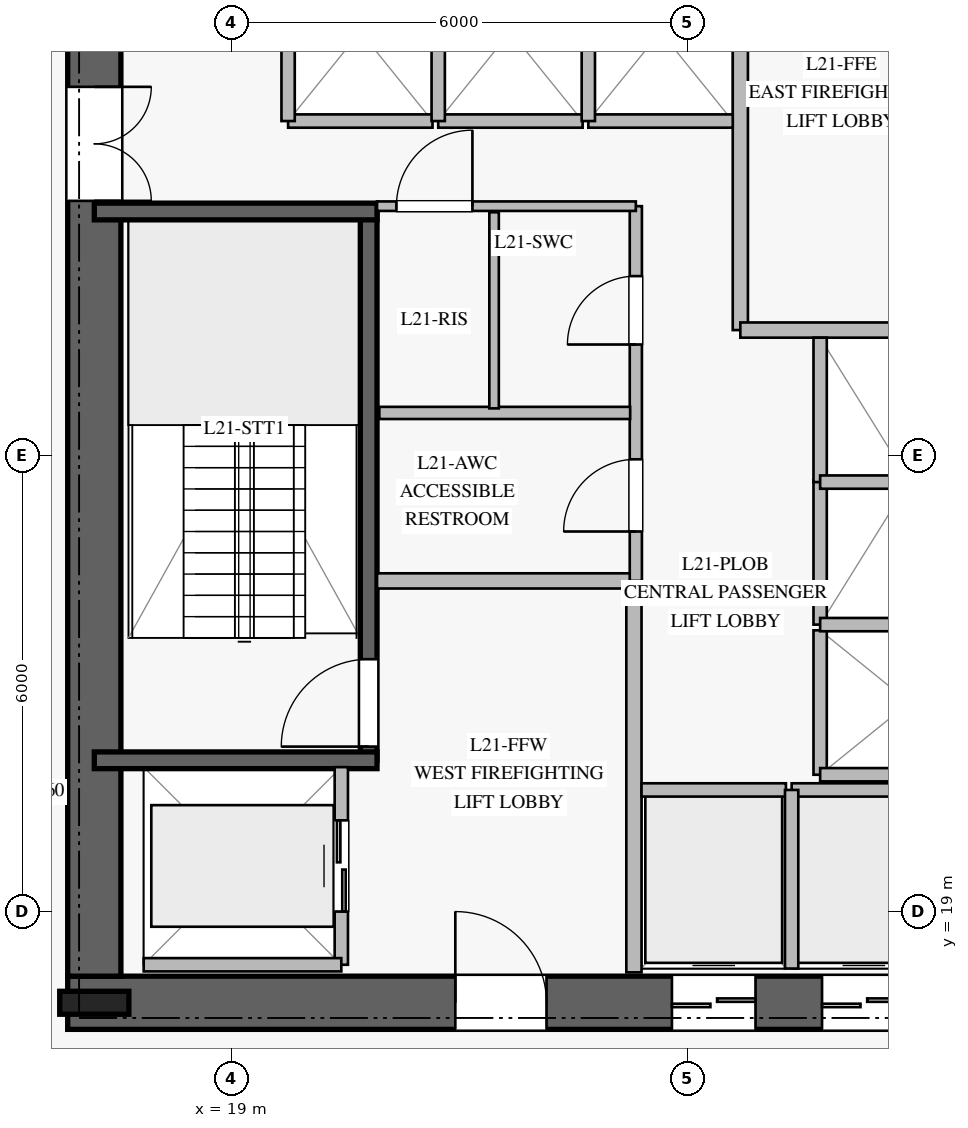
"""IFC4 building model, lengths in metres.
Left out: names, types, materials, properties, quantities, classifications, styles, units other than length and angle.
Written with IfcOpenShell. Run it as: python <this file> out.ifc"""

import sys

from ifc_helpers import new_model, si_unit, direction, frame, frame_2d, origin, origin_2d, place, context, subcontext, project, spatial, rectangle, i_section, extrude, element, fill, save


model = new_model("IFC4")
c1 = context("Model", 3, precision=1e-05, world=origin(), true_north=direction((0.0, 1.0)))
c2 = subcontext(c1, "Body", "Model", "MODEL_VIEW")
j1 = project(units=[si_unit("LENGTHUNIT", "METRE"), si_unit("PLANEANGLEUNIT", "RADIAN")], contexts=[c1])
p1 = place(None, origin())
s1 = spatial("IfcSite", under=j1, at=p1, CompositionType="ELEMENT")
p2 = place(p1, origin())
s2 = spatial("IfcBuilding", under=s1, at=p2, CompositionType="ELEMENT")
p3 = place(p2, frame((0.0, 0.0, 88.0)))
s3 = spatial("IfcBuildingStorey", under=s2, at=p3, CompositionType="ELEMENT", Elevation=88.0)
p4 = place(p3, frame((16.85, 17.8, 0.0), z_axis=(0.0, 0.0, 1.0), x_axis=(1.0, 0.0, 0.0)))
e1 = element("IfcWall", 1, at=p4, inside=s3, PredefinedType="SHEAR", context=c2, shape_type="SweptSolid", body=[
    extrude(rectangle(XDim=16.3, YDim=0.7, at=frame_2d((8.15, 0.0))), origin(), (0.0, 0.0, 1.0), 3.7),
])
p5 = place(p4, frame((5.1, 0.0, 0.0)))
e2 = element("IfcOpeningElement", 2, at=p5, cuts=e1, PredefinedType="OPENING", context=c2, shape_type="SweptSolid", body=[
    extrude(rectangle(XDim=1.2, YDim=2.25, at=frame_2d((0.6, 1.125))), frame((0.0, 0.36, 0.0), z_axis=(0.0, -1.0, 0.0), x_axis=(1.0, 0.0, 0.0)), (0.0, 0.0, 1.0), 0.72),
])
p6 = place(p4, frame((14.05, 0.0, 0.0)))
e3 = element("IfcOpeningElement", 3, at=p6, cuts=e1, PredefinedType="OPENING", context=c2, shape_type="SweptSolid", body=[
    extrude(rectangle(XDim=0.9, YDim=2.1, at=frame_2d((0.45, 1.05))), frame((0.0, 0.36, 0.0), z_axis=(0.0, -1.0, 0.0), x_axis=(1.0, 0.0, 0.0)), (0.0, 0.0, 1.0), 0.72),
])
p7 = place(p4, frame((7.95, 0.0, 0.0)))
e4 = element("IfcOpeningElement", 4, at=p7, cuts=e1, PredefinedType="OPENING", context=c2, shape_type="SweptSolid", body=[
    extrude(rectangle(XDim=1.1, YDim=2.2, at=frame_2d((0.55, 1.1))), frame((0.0, 0.36, 0.0), z_axis=(0.0, -1.0, 0.0), x_axis=(1.0, 0.0, 0.0)), (0.0, 0.0, 1.0), 0.72),
])
p8 = place(p4, frame((9.925, 0.0, 0.0)))
e5 = element("IfcOpeningElement", 5, at=p8, cuts=e1, PredefinedType="OPENING", context=c2, shape_type="SweptSolid", body=[
    extrude(rectangle(XDim=1.1, YDim=2.2, at=frame_2d((0.55, 1.1))), frame((0.0, 0.36, 0.0), z_axis=(0.0, -1.0, 0.0), x_axis=(1.0, 0.0, 0.0)), (0.0, 0.0, 1.0), 0.72),
])
p9 = place(p4, frame((11.9, 0.0, 0.0)))
e6 = element("IfcOpeningElement", 6, at=p9, cuts=e1, PredefinedType="OPENING", context=c2, shape_type="SweptSolid", body=[
    extrude(rectangle(XDim=1.1, YDim=2.2, at=frame_2d((0.55, 1.1))), frame((0.0, 0.36, 0.0), z_axis=(0.0, -1.0, 0.0), x_axis=(1.0, 0.0, 0.0)), (0.0, 0.0, 1.0), 0.72),
])
p10 = place(p3, frame((17.2, 31.85, 0.0), z_axis=(0.0, 0.0, 1.0), x_axis=(0.0, -1.0, 0.0)))
e7 = element("IfcWall", 7, at=p10, inside=s3, PredefinedType="SHEAR", context=c2, shape_type="SweptSolid", body=[
    extrude(rectangle(XDim=13.7, YDim=0.7, at=frame_2d((6.85, 0.0))), origin(), (0.0, 0.0, 1.0), 3.7),
])
p11 = place(p10, frame((2.0, 0.0, 0.0)))
e8 = element("IfcOpeningElement", 8, at=p11, cuts=e7, PredefinedType="OPENING", context=c2, shape_type="SweptSolid", body=[
    extrude(rectangle(XDim=1.5, YDim=2.2, at=frame_2d((0.75, 1.1))), frame((0.0, 0.36, 0.0), z_axis=(0.0, -1.0, 0.0), x_axis=(1.0, 0.0, 0.0)), (0.0, 0.0, 1.0), 0.72),
])
p12 = place(p3, frame((17.2, 17.8, 0.0), z_axis=(0.0, 0.0, 1.0), x_axis=(1.0, 0.0, 0.0)))
e9 = element("IfcColumn", 9, at=p12, inside=s3, PredefinedType="COLUMN", context=c2, shape_type="SweptSolid", body=[
    extrude(i_section(OverallWidth=0.302, OverallDepth=0.91, WebThickness=0.021, FlangeThickness=0.04, at=origin_2d()), origin(), (0.0, 0.0, 1.0), 4.0),
])
p13 = place(p3, frame((20.81, 20.99, 0.0), z_axis=(0.0, 0.0, 1.0), x_axis=(0.0, 1.0, 0.0)))
e10 = element("IfcWall", 10, at=p13, inside=s3, PredefinedType="SOLIDWALL", context=c2, shape_type="SweptSolid", body=[
    extrude(rectangle(XDim=7.22, YDim=0.22, at=frame_2d((3.61, 0.0))), origin(), (0.0, 0.0, 1.0), 3.7),
])
p14 = place(p13, frame((0.18, 0.0, 0.0)))
e11 = element("IfcOpeningElement", 11, at=p14, cuts=e10, PredefinedType="OPENING", context=c2, shape_type="SweptSolid", body=[
    extrude(rectangle(XDim=1.15, YDim=2.2, at=frame_2d((0.575, 1.1))), frame((0.0, 0.12, 0.0), z_axis=(0.0, -1.0, 0.0), x_axis=(1.0, 0.0, 0.0)), (0.0, 0.0, 1.0), 0.24),
])
for number, where, z_axis, x_axis in (
    (12, (17.2, 20.99, 0.0), (0.0, 0.0, 1.0), (1.0, 0.0, 0.0)),
    (13, (17.2, 28.21, 0.0), (0.0, 0.0, 1.0), (1.0, 0.0, 0.0)),
):
    element("IfcWall", number, at=place(p3, frame(where, z_axis=z_axis, x_axis=x_axis)), inside=s3, PredefinedType="SOLIDWALL", context=c2, shape_type="SweptSolid", body=[
        extrude(rectangle(XDim=3.72, YDim=0.22, at=frame_2d((1.86, 0.0))), origin(), (0.0, 0.0, 1.0), 3.7),
    ])
p15 = place(p3, frame((24.3, 18.2, 0.0), z_axis=(0.0, 0.0, 1.0), x_axis=(0.0, 1.0, 0.0)))
e14 = element("IfcWall", 14, at=p15, inside=s3, PredefinedType="PARTITIONING", context=c2, shape_type="SweptSolid", body=[
    extrude(rectangle(XDim=5.15, YDim=0.2, at=frame_2d((2.575, 0.0))), origin(), (0.0, 0.0, 1.0), 3.7),
])
p16 = place(p3, frame((20.92, 23.35, 0.0), z_axis=(0.0, 0.0, 1.0), x_axis=(1.0, 0.0, 0.0)))
e15 = element("IfcWall", 15, at=p16, inside=s3, PredefinedType="PARTITIONING", context=c2, shape_type="SweptSolid", body=[
    extrude(rectangle(XDim=3.38, YDim=0.2, at=frame_2d((1.69, 0.0))), origin(), (0.0, 0.0, 1.0), 3.7),
])
p17 = place(p3, frame((25.7, 26.65, 0.0), z_axis=(0.0, 0.0, 1.0), x_axis=(0.0, 1.0, 0.0)))
e16 = element("IfcWall", 16, at=p17, inside=s3, PredefinedType="PARTITIONING", context=c2, shape_type="SweptSolid", body=[
    extrude(rectangle(XDim=5.15, YDim=0.2, at=frame_2d((2.575, 0.0))), origin(), (0.0, 0.0, 1.0), 3.7),
])
p18 = place(p3, frame((25.7, 26.65, 0.0), z_axis=(0.0, 0.0, 1.0), x_axis=(1.0, 0.0, 0.0)))
e17 = element("IfcWall", 17, at=p18, inside=s3, PredefinedType="PARTITIONING", context=c2, shape_type="SweptSolid", body=[
    extrude(rectangle(XDim=3.38, YDim=0.2, at=frame_2d((1.69, 0.0))), origin(), (0.0, 0.0, 1.0), 3.7),
])
p19 = place(p3, frame((24.325, 23.35, 0.0), z_axis=(0.0, 0.0, 1.0), x_axis=(0.0, 1.0, 0.0)))
e18 = element("IfcWall", 18, at=p19, inside=s3, PredefinedType="PLUMBINGWALL", context=c2, shape_type="SweptSolid", body=[
    extrude(rectangle(XDim=4.93, YDim=0.16, at=frame_2d((2.465, 0.0))), origin(), (0.0, 0.0, 1.0), 3.7),
])
p20 = place(p19, frame((0.65, 0.0, 0.0)))
e19 = element("IfcOpeningElement", 19, at=p20, cuts=e18, PredefinedType="OPENING", context=c2, shape_type="SweptSolid", body=[
    extrude(rectangle(XDim=0.95, YDim=2.1, at=frame_2d((0.475, 1.05))), frame((0.0, 0.09, 0.0), z_axis=(0.0, -1.0, 0.0), x_axis=(1.0, 0.0, 0.0)), (0.0, 0.0, 1.0), 0.18),
])
p21 = place(p19, frame((3.11, 0.0, 0.0)))
e20 = element("IfcOpeningElement", 20, at=p21, cuts=e18, PredefinedType="OPENING", context=c2, shape_type="SweptSolid", body=[
    extrude(rectangle(XDim=0.9, YDim=2.1, at=frame_2d((0.45, 1.05))), frame((0.0, 0.09, 0.0), z_axis=(0.0, -1.0, 0.0), x_axis=(1.0, 0.0, 0.0)), (0.0, 0.0, 1.0), 0.18),
])
p22 = place(p3, frame((20.92, 28.28, 0.0), z_axis=(0.0, 0.0, 1.0), x_axis=(1.0, 0.0, 0.0)))
e21 = element("IfcWall", 21, at=p22, inside=s3, PredefinedType="PARTITIONING", context=c2, shape_type="SweptSolid", body=[
    extrude(rectangle(XDim=3.405, YDim=0.125, at=frame_2d((1.703, 0.0))), origin(), (0.0, 0.0, 1.0), 3.7),
])
p23 = place(p22, frame((0.255, 0.0, 0.0)))
e22 = element("IfcOpeningElement", 22, at=p23, cuts=e21, PredefinedType="OPENING", context=c2, shape_type="SweptSolid", body=[
    extrude(rectangle(XDim=1.0, YDim=2.15, at=frame_2d((0.5, 1.075))), frame((0.0, 0.073, 0.0), z_axis=(0.0, -1.0, 0.0), x_axis=(1.0, 0.0, 0.0)), (0.0, 0.0, 1.0), 0.145),
])
p24 = place(p3, frame((20.95, 25.56, 0.0), z_axis=(0.0, 0.0, 1.0), x_axis=(1.0, 0.0, 0.0)))
e23 = element("IfcWall", 23, at=p24, inside=s3, PredefinedType="PLUMBINGWALL", context=c2, shape_type="SweptSolid", body=[
    extrude(rectangle(XDim=3.3, YDim=0.16, at=frame_2d((1.65, 0.0))), origin(), (0.0, 0.0, 1.0), 3.7),
])
p25 = place(p3, frame((22.46, 25.62, 0.0), z_axis=(0.0, 0.0, 1.0), x_axis=(0.0, 1.0, 0.0)))
e24 = element("IfcWall", 24, at=p25, inside=s3, PredefinedType="PARTITIONING", context=c2, shape_type="SweptSolid", body=[
    extrude(rectangle(XDim=2.58, YDim=0.125, at=frame_2d((1.29, 0.0))), origin(), (0.0, 0.0, 1.0), 3.7),
])
p26 = place(p3, frame((24.4, 20.6, 0.0), z_axis=(0.0, 0.0, 1.0), x_axis=(1.0, 0.0, 0.0)))
e25 = element("IfcWall", 25, at=p26, inside=s3, PredefinedType="PARTITIONING", context=c2, shape_type="SweptSolid", body=[
    extrude(rectangle(XDim=1.9, YDim=0.175, at=frame_2d((0.95, 0.0))), origin(), (0.0, 0.0, 1.0), 3.7),
])
p27 = place(p3, frame((26.375, 20.6, 0.0), z_axis=(0.0, 0.0, 1.0), x_axis=(1.0, 0.0, 0.0)))
e26 = element("IfcWall", 26, at=p27, inside=s3, PredefinedType="PARTITIONING", context=c2, shape_type="SweptSolid", body=[
    extrude(rectangle(XDim=1.9, YDim=0.175, at=frame_2d((0.95, 0.0))), origin(), (0.0, 0.0, 1.0), 3.7),
])
p28 = place(p3, frame((26.375, 18.25, 0.0), z_axis=(0.0, 0.0, 1.0), x_axis=(0.0, 1.0, 0.0)))
e27 = element("IfcWall", 27, at=p28, inside=s3, PredefinedType="PARTITIONING", context=c2, shape_type="SweptSolid", body=[
    extrude(rectangle(XDim=2.35, YDim=0.175, at=frame_2d((1.175, 0.0))), origin(), (0.0, 0.0, 1.0), 3.7),
])
p29 = place(p3, frame((19.75, 29.4, 0.0), z_axis=(0.0, 0.0, 1.0), x_axis=(1.0, 0.0, 0.0)))
e28 = element("IfcWall", 28, at=p29, inside=s3, PredefinedType="PARTITIONING", context=c2, shape_type="SweptSolid", body=[
    extrude(rectangle(XDim=1.9, YDim=0.175, at=frame_2d((0.95, 0.0))), origin(), (0.0, 0.0, 1.0), 3.7),
])
p30 = place(p3, frame((19.75, 29.4, 0.0), z_axis=(0.0, 0.0, 1.0), x_axis=(0.0, 1.0, 0.0)))
e29 = element("IfcWall", 29, at=p30, inside=s3, PredefinedType="PARTITIONING", context=c2, shape_type="SweptSolid", body=[
    extrude(rectangle(XDim=2.35, YDim=0.175, at=frame_2d((1.175, 0.0))), origin(), (0.0, 0.0, 1.0), 3.7),
])
p31 = place(p3, frame((21.725, 29.4, 0.0), z_axis=(0.0, 0.0, 1.0), x_axis=(1.0, 0.0, 0.0)))
e30 = element("IfcWall", 30, at=p31, inside=s3, PredefinedType="PARTITIONING", context=c2, shape_type="SweptSolid", body=[
    extrude(rectangle(XDim=1.9, YDim=0.175, at=frame_2d((0.95, 0.0))), origin(), (0.0, 0.0, 1.0), 3.7),
])
p32 = place(p3, frame((21.725, 29.4, 0.0), z_axis=(0.0, 0.0, 1.0), x_axis=(0.0, 1.0, 0.0)))
e31 = element("IfcWall", 31, at=p32, inside=s3, PredefinedType="PARTITIONING", context=c2, shape_type="SweptSolid", body=[
    extrude(rectangle(XDim=2.35, YDim=0.175, at=frame_2d((1.175, 0.0))), origin(), (0.0, 0.0, 1.0), 3.7),
])
p33 = place(p3, frame((23.7, 29.4, 0.0), z_axis=(0.0, 0.0, 1.0), x_axis=(1.0, 0.0, 0.0)))
e32 = element("IfcWall", 32, at=p33, inside=s3, PredefinedType="PARTITIONING", context=c2, shape_type="SweptSolid", body=[
    extrude(rectangle(XDim=1.9, YDim=0.175, at=frame_2d((0.95, 0.0))), origin(), (0.0, 0.0, 1.0), 3.7),
])
p34 = place(p3, frame((23.7, 29.4, 0.0), z_axis=(0.0, 0.0, 1.0), x_axis=(0.0, 1.0, 0.0)))
e33 = element("IfcWall", 33, at=p34, inside=s3, PredefinedType="PARTITIONING", context=c2, shape_type="SweptSolid", body=[
    extrude(rectangle(XDim=2.35, YDim=0.175, at=frame_2d((1.175, 0.0))), origin(), (0.0, 0.0, 1.0), 3.7),
])
p35 = place(p3, frame((26.75, 20.8, 0.0), z_axis=(0.0, 0.0, 1.0), x_axis=(0.0, 1.0, 0.0)))
e34 = element("IfcWall", 34, at=p35, inside=s3, PredefinedType="PARTITIONING", context=c2, shape_type="SweptSolid", body=[
    extrude(rectangle(XDim=1.9, YDim=0.175, at=frame_2d((0.95, 0.0))), origin(), (0.0, 0.0, 1.0), 3.7),
])
p36 = place(p3, frame((26.75, 20.8, 0.0), z_axis=(0.0, 0.0, 1.0), x_axis=(1.0, 0.0, 0.0)))
e35 = element("IfcWall", 35, at=p36, inside=s3, PredefinedType="PARTITIONING", context=c2, shape_type="SweptSolid", body=[
    extrude(rectangle(XDim=2.35, YDim=0.175, at=frame_2d((1.175, 0.0))), origin(), (0.0, 0.0, 1.0), 3.7),
])
p37 = place(p3, frame((26.75, 22.775, 0.0), z_axis=(0.0, 0.0, 1.0), x_axis=(0.0, 1.0, 0.0)))
e36 = element("IfcWall", 36, at=p37, inside=s3, PredefinedType="PARTITIONING", context=c2, shape_type="SweptSolid", body=[
    extrude(rectangle(XDim=1.9, YDim=0.175, at=frame_2d((0.95, 0.0))), origin(), (0.0, 0.0, 1.0), 3.7),
])
p38 = place(p3, frame((26.75, 22.775, 0.0), z_axis=(0.0, 0.0, 1.0), x_axis=(1.0, 0.0, 0.0)))
e37 = element("IfcWall", 37, at=p38, inside=s3, PredefinedType="PARTITIONING", context=c2, shape_type="SweptSolid", body=[
    extrude(rectangle(XDim=2.35, YDim=0.175, at=frame_2d((1.175, 0.0))), origin(), (0.0, 0.0, 1.0), 3.7),
])
p39 = place(p3, frame((26.75, 24.65, 0.0), z_axis=(0.0, 0.0, 1.0), x_axis=(0.0, 1.0, 0.0)))
e38 = element("IfcWall", 38, at=p39, inside=s3, PredefinedType="PARTITIONING", context=c2, shape_type="SweptSolid", body=[
    extrude(rectangle(XDim=1.9, YDim=0.175, at=frame_2d((0.95, 0.0))), origin(), (0.0, 0.0, 1.0), 3.7),
])
p40 = place(p3, frame((26.75, 24.65, 0.0), z_axis=(0.0, 0.0, 1.0), x_axis=(1.0, 0.0, 0.0)))
e39 = element("IfcWall", 39, at=p40, inside=s3, PredefinedType="PARTITIONING", context=c2, shape_type="SweptSolid", body=[
    extrude(rectangle(XDim=2.35, YDim=0.175, at=frame_2d((1.175, 0.0))), origin(), (0.0, 0.0, 1.0), 3.7),
])
p41 = place(p3, frame((20.45, 18.3, 0.0), z_axis=(0.0, 0.0, 1.0), x_axis=(0.0, 1.0, 0.0)))
e40 = element("IfcWall", 40, at=p41, inside=s3, PredefinedType="PARTITIONING", context=c2, shape_type="SweptSolid", body=[
    extrude(rectangle(XDim=2.6, YDim=0.175, at=frame_2d((1.3, 0.0))), origin(), (0.0, 0.0, 1.0), 3.7),
])
p42 = place(p41, frame((0.7, 0.0, 0.0)))
e41 = element("IfcOpeningElement", 41, at=p42, cuts=e40, PredefinedType="OPENING", context=c2, shape_type="SweptSolid", body=[
    extrude(rectangle(XDim=1.2, YDim=2.2, at=frame_2d((0.6, 1.1))), frame((0.0, 0.098, 0.0), z_axis=(0.0, -1.0, 0.0), x_axis=(1.0, 0.0, 0.0)), (0.0, 0.0, 1.0), 0.195),
])
p43 = place(p3, frame((17.85, 18.3, 0.0), z_axis=(0.0, 0.0, 1.0), x_axis=(1.0, 0.0, 0.0)))
e42 = element("IfcWall", 42, at=p43, inside=s3, PredefinedType="PARTITIONING", context=c2, shape_type="SweptSolid", body=[
    extrude(rectangle(XDim=2.6, YDim=0.175, at=frame_2d((1.3, 0.0))), origin(), (0.0, 0.0, 1.0), 3.7),
])
p44 = place(p14, origin())
e43 = element("IfcDoor", 43, at=p44, inside=s3, OperationType="SINGLE_SWING_LEFT", PredefinedType="DOOR", context=c2, shape_type="SweptSolid", body=[
    extrude(rectangle(XDim=1.15, YDim=2.2, at=frame_2d((0.575, 1.1))), frame((0.0, 0.025, 0.0), z_axis=(0.0, -1.0, 0.0), x_axis=(1.0, 0.0, 0.0)), (0.0, 0.0, 1.0), 0.05),
])
fill(e11, e43)
p45 = place(p5, origin())
e44 = element("IfcDoor", 44, at=p45, inside=s3, OperationType="SINGLE_SWING_LEFT", PredefinedType="DOOR", context=c2, shape_type="SweptSolid", body=[
    extrude(rectangle(XDim=1.2, YDim=2.25, at=frame_2d((0.6, 1.125))), frame((0.0, 0.025, 0.0), z_axis=(0.0, -1.0, 0.0), x_axis=(1.0, 0.0, 0.0)), (0.0, 0.0, 1.0), 0.05),
])
fill(e2, e44)
p46 = place(p11, origin())
e45 = element("IfcDoor", 45, at=p46, inside=s3, OperationType="DOUBLE_DOOR_SINGLE_SWING", PredefinedType="DOOR", context=c2, shape_type="SweptSolid", body=[
    extrude(rectangle(XDim=1.5, YDim=2.2, at=frame_2d((0.75, 1.1))), frame((0.0, 0.025, 0.0), z_axis=(0.0, -1.0, 0.0), x_axis=(1.0, 0.0, 0.0)), (0.0, 0.0, 1.0), 0.05),
])
fill(e8, e45)
p47 = place(p20, origin())
e46 = element("IfcDoor", 46, at=p47, inside=s3, OperationType="SINGLE_SWING_LEFT", PredefinedType="DOOR", context=c2, shape_type="SweptSolid", body=[
    extrude(rectangle(XDim=0.95, YDim=2.1, at=frame_2d((0.475, 1.05))), frame((0.0, 0.025, 0.0), z_axis=(0.0, -1.0, 0.0), x_axis=(1.0, 0.0, 0.0)), (0.0, 0.0, 1.0), 0.05),
])
fill(e19, e46)
p48 = place(p23, origin())
e47 = element("IfcDoor", 47, at=p48, inside=s3, OperationType="SINGLE_SWING_RIGHT", PredefinedType="DOOR", context=c2, shape_type="SweptSolid", body=[
    extrude(rectangle(XDim=1.0, YDim=2.15, at=frame_2d((0.5, 1.075))), frame((0.0, 0.025, 0.0), z_axis=(0.0, -1.0, 0.0), x_axis=(1.0, 0.0, 0.0)), (0.0, 0.0, 1.0), 0.05),
])
fill(e22, e47)
p49 = place(p21, origin())
e48 = element("IfcDoor", 48, at=p49, inside=s3, OperationType="SINGLE_SWING_LEFT", PredefinedType="DOOR", context=c2, shape_type="SweptSolid", body=[
    extrude(rectangle(XDim=0.9, YDim=2.1, at=frame_2d((0.45, 1.05))), frame((0.0, 0.025, 0.0), z_axis=(0.0, -1.0, 0.0), x_axis=(1.0, 0.0, 0.0)), (0.0, 0.0, 1.0), 0.05),
])
fill(e20, e48)
p50 = place(p7, origin())
e49 = element("IfcDoor", 49, at=p50, inside=s3, OperationType="DOUBLE_DOOR_SLIDING", PredefinedType="DOOR", context=c2, shape_type="SweptSolid", body=[
    extrude(rectangle(XDim=1.1, YDim=2.2, at=frame_2d((0.55, 1.1))), frame((0.0, 0.025, 0.0), z_axis=(0.0, -1.0, 0.0), x_axis=(1.0, 0.0, 0.0)), (0.0, 0.0, 1.0), 0.05),
])
fill(e4, e49)
p51 = place(p8, origin())
e50 = element("IfcDoor", 50, at=p51, inside=s3, OperationType="DOUBLE_DOOR_SLIDING", PredefinedType="DOOR", context=c2, shape_type="SweptSolid", body=[
    extrude(rectangle(XDim=1.1, YDim=2.2, at=frame_2d((0.55, 1.1))), frame((0.0, 0.025, 0.0), z_axis=(0.0, -1.0, 0.0), x_axis=(1.0, 0.0, 0.0)), (0.0, 0.0, 1.0), 0.05),
])
fill(e5, e50)
p52 = place(p42, origin())
e51 = element("IfcDoor", 51, at=p52, inside=s3, OperationType="DOUBLE_DOOR_SLIDING", PredefinedType="DOOR", context=c2, shape_type="SweptSolid", body=[
    extrude(rectangle(XDim=1.2, YDim=2.2, at=frame_2d((0.6, 1.1))), frame((0.0, 0.025, 0.0), z_axis=(0.0, -1.0, 0.0), x_axis=(1.0, 0.0, 0.0)), (0.0, 0.0, 1.0), 0.05),
])
fill(e41, e51)
save(model, sys.argv[1])
